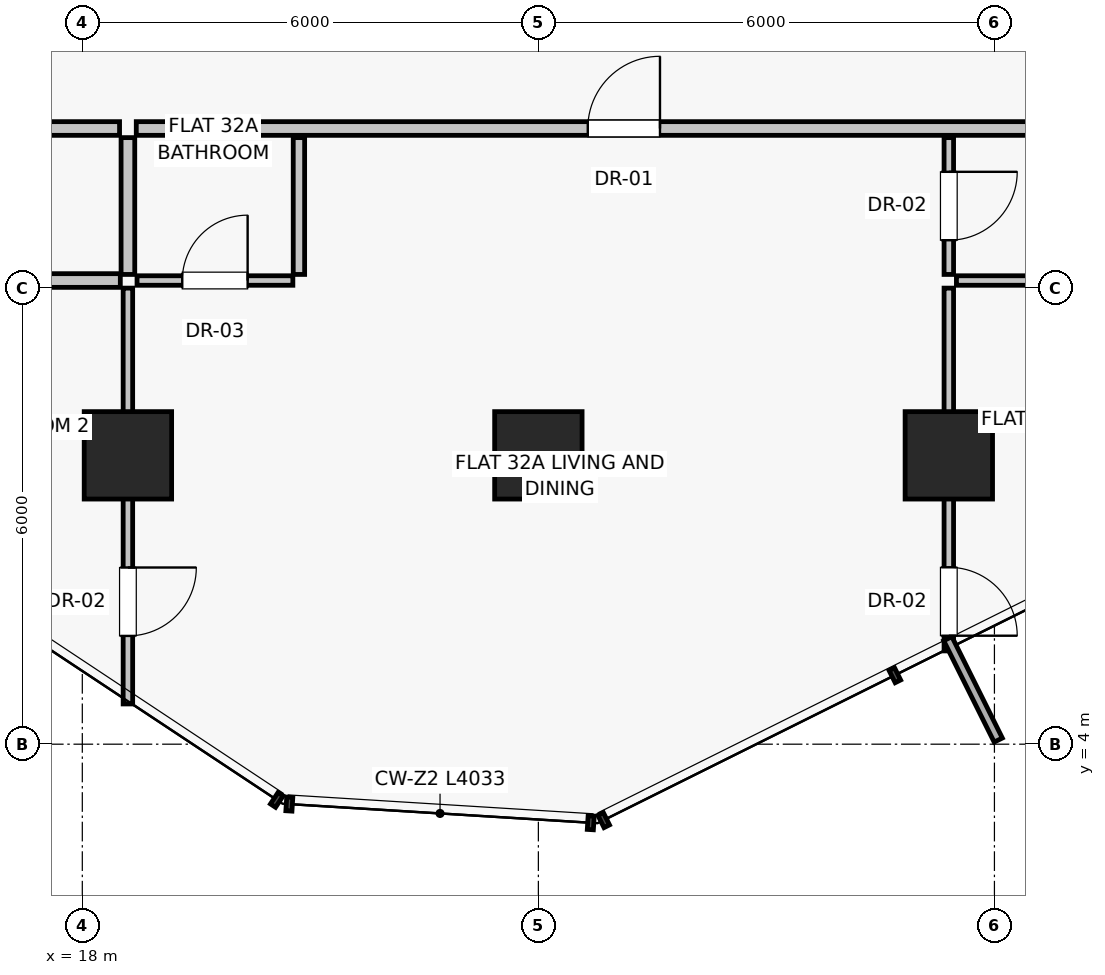
"""IFC4 building model, lengths in metres.
Left out: names, types, materials, properties, quantities, classifications, styles, units other than length and angle.
Written with IfcOpenShell. Run it as: python <this file> out.ifc"""

import sys

from ifc_helpers import new_model, si_unit, direction, frame, frame_2d, origin, origin_2d, place, context, subcontext, project, spatial, rectangle, extrude, source, transform, mapped, element, fill, save


model = new_model("IFC4")
c1 = context("Model", 3, precision=1e-05, world=origin(), true_north=direction((0.0, 1.0)))
c2 = subcontext(c1, "Body", "Model", "MODEL_VIEW")
j1 = project(units=[si_unit("LENGTHUNIT", "METRE"), si_unit("PLANEANGLEUNIT", "RADIAN")], contexts=[c1])
p1 = place(None, origin())
s1 = spatial("IfcSite", under=j1, at=p1, CompositionType="ELEMENT")
p2 = place(p1, origin())
s2 = spatial("IfcBuilding", under=s1, at=p2, CompositionType="ELEMENT")
p3 = place(p2, frame((0.0, 0.0, 116.5)))
s3 = spatial("IfcBuildingStorey", under=s2, at=p3, CompositionType="ELEMENT", Elevation=116.5)
for number, where, z_axis, x_axis in (
    (1, (18.6, 7.8, 0.0), (0.0, 0.0, 1.0), (1.0, 0.0, 0.0)),
    (2, (24.0, 7.8, 0.0), (0.0, 0.0, 1.0), (1.0, 0.0, 0.0)),
    (3, (29.4, 7.8, 0.0), (0.0, 0.0, 1.0), (1.0, 0.0, 0.0)),
):
    element("IfcColumn", number, at=place(p3, frame(where, z_axis=z_axis, x_axis=x_axis)), inside=s3, PredefinedType="COLUMN", context=c2, shape_type="SweptSolid", body=[
        extrude(rectangle(XDim=1.15, YDim=1.15, at=origin_2d()), origin(), (0.0, 0.0, 1.0), 3.25),
    ])
p4 = place(p3, frame((14.51, 12.1, 0.0), z_axis=(0.0, 0.0, 1.0), x_axis=(1.0, 0.0, 0.0)))
e4 = element("IfcWall", 4, at=p4, inside=s3, PredefinedType="PARTITIONING", context=c2, shape_type="SweptSolid", body=[
    extrude(rectangle(XDim=3.98, YDim=0.18, at=frame_2d((1.99, 0.0))), origin(), (0.0, 0.0, 1.0), 2.58),
])
p5 = place(p4, frame((1.49, 0.0, 0.0)))
e5 = element("IfcOpeningElement", 5, at=p5, cuts=e4, PredefinedType="OPENING", context=c2, shape_type="SweptSolid", body=[
    extrude(rectangle(XDim=1.0, YDim=2.01, at=frame_2d((0.5, 1.005))), frame((0.0, 0.1, 0.0), z_axis=(0.0, -1.0, 0.0), x_axis=(1.0, 0.0, 0.0)), (0.0, 0.0, 1.0), 0.2),
])
p6 = place(p3, frame((18.71, 12.1, 0.0), z_axis=(0.0, 0.0, 1.0), x_axis=(1.0, 0.0, 0.0)))
e6 = element("IfcWall", 6, at=p6, inside=s3, PredefinedType="PARTITIONING", context=c2, shape_type="SweptSolid", body=[
    extrude(rectangle(XDim=14.78, YDim=0.18, at=frame_2d((7.39, 0.0))), origin(), (0.0, 0.0, 1.0), 2.58),
])
p7 = place(p6, frame((5.94, 0.0, 0.0)))
e7 = element("IfcOpeningElement", 7, at=p7, cuts=e6, PredefinedType="OPENING", context=c2, shape_type="SweptSolid", body=[
    extrude(rectangle(XDim=0.95, YDim=2.02, at=frame_2d((0.475, 1.01))), frame((0.0, 0.1, 0.0), z_axis=(0.0, -1.0, 0.0), x_axis=(1.0, 0.0, 0.0)), (0.0, 0.0, 1.0), 0.2),
])
p8 = place(p3, frame((14.52, 10.1, 0.0), z_axis=(0.0, 0.0, 1.0), x_axis=(1.0, 0.0, 0.0)))
e8 = element("IfcWall", 8, at=p8, inside=s3, PredefinedType="PARTITIONING", context=c2, shape_type="SweptSolid", body=[
    extrude(rectangle(XDim=3.98, YDim=0.18, at=frame_2d((1.99, 0.0))), origin(), (0.0, 0.0, 1.0), 3.0),
])
p9 = place(p3, frame((18.6, 11.98, 0.0), z_axis=(0.0, 0.0, 1.0), x_axis=(0.0, -1.0, 0.0)))
e9 = element("IfcWall", 9, at=p9, inside=s3, PredefinedType="PARTITIONING", context=c2, shape_type="SweptSolid", body=[
    extrude(rectangle(XDim=1.8, YDim=0.18, at=frame_2d((0.9, 0.0))), origin(), (0.0, 0.0, 1.0), 2.378),
])
p10 = place(p3, frame((18.6, 10.0, 0.0), z_axis=(0.0, 0.0, 1.0), x_axis=(0.0, -1.0, 0.0)))
e10 = element("IfcWall", 10, at=p10, inside=s3, PredefinedType="PARTITIONING", context=c2, shape_type="SweptSolid", body=[
    extrude(rectangle(XDim=5.471, YDim=0.125, at=frame_2d((2.735, 0.0))), origin(), (0.0, 0.0, 1.0), 2.378),
])
p11 = place(p10, frame((3.676, 0.0, 0.0)))
e11 = element("IfcOpeningElement", 11, at=p11, cuts=e10, PredefinedType="OPENING", context=c2, shape_type="SweptSolid", body=[
    extrude(rectangle(XDim=0.9, YDim=2.01, at=frame_2d((0.45, 1.005))), frame((0.0, 0.073, 0.0), z_axis=(0.0, -1.0, 0.0), x_axis=(1.0, 0.0, 0.0)), (0.0, 0.0, 1.0), 0.145),
])
p12 = place(p3, frame((20.85, 11.98, 0.0), z_axis=(0.0, 0.0, 1.0), x_axis=(0.0, -1.0, 0.0)))
e12 = element("IfcWall", 12, at=p12, inside=s3, PredefinedType="PARTITIONING", context=c2, shape_type="SweptSolid", body=[
    extrude(rectangle(XDim=1.8, YDim=0.15, at=frame_2d((0.9, 0.0))), origin(), (0.0, 0.0, 1.0), 3.0),
])
p13 = place(p3, frame((18.72, 10.1, 0.0), z_axis=(0.0, 0.0, 1.0), x_axis=(1.0, 0.0, 0.0)))
e13 = element("IfcWall", 13, at=p13, inside=s3, PredefinedType="PARTITIONING", context=c2, shape_type="SweptSolid", body=[
    extrude(rectangle(XDim=2.05, YDim=0.125, at=frame_2d((1.025, 0.0))), origin(), (0.0, 0.0, 1.0), 3.0),
])
p14 = place(p13, frame((0.595, 0.0, 0.0)))
e14 = element("IfcOpeningElement", 14, at=p14, cuts=e13, PredefinedType="OPENING", context=c2, shape_type="SweptSolid", body=[
    extrude(rectangle(XDim=0.86, YDim=2.01, at=frame_2d((0.43, 1.005))), frame((0.0, 0.073, 0.0), z_axis=(0.0, -1.0, 0.0), x_axis=(1.0, 0.0, 0.0)), (0.0, 0.0, 1.0), 0.145),
])
p15 = place(p3, frame((29.4, 11.98, 0.0), z_axis=(0.0, 0.0, 1.0), x_axis=(0.0, -1.0, 0.0)))
e15 = element("IfcWall", 15, at=p15, inside=s3, PredefinedType="PARTITIONING", context=c2, shape_type="SweptSolid", body=[
    extrude(rectangle(XDim=1.8, YDim=0.125, at=frame_2d((0.9, 0.0))), origin(), (0.0, 0.0, 1.0), 2.378),
])
p16 = place(p15, frame((0.45, 0.0, 0.0)))
e16 = element("IfcOpeningElement", 16, at=p16, cuts=e15, PredefinedType="OPENING", context=c2, shape_type="SweptSolid", body=[
    extrude(rectangle(XDim=0.9, YDim=2.01, at=frame_2d((0.45, 1.005))), frame((0.0, 0.073, 0.0), z_axis=(0.0, -1.0, 0.0), x_axis=(1.0, 0.0, 0.0)), (0.0, 0.0, 1.0), 0.145),
])
p17 = place(p3, frame((29.5, 10.1, 0.0), z_axis=(0.0, 0.0, 1.0), x_axis=(1.0, 0.0, 0.0)))
e17 = element("IfcWall", 17, at=p17, inside=s3, PredefinedType="PARTITIONING", context=c2, shape_type="SweptSolid", body=[
    extrude(rectangle(XDim=3.98, YDim=0.125, at=frame_2d((1.99, 0.0))), origin(), (0.0, 0.0, 1.0), 3.0),
])
p18 = place(p3, frame((29.4, 10.0, 0.0), z_axis=(0.0, 0.0, 1.0), x_axis=(0.0, -1.0, 0.0)))
e18 = element("IfcWall", 18, at=p18, inside=s3, PredefinedType="PARTITIONING", context=c2, shape_type="SweptSolid", body=[
    extrude(rectangle(XDim=4.773, YDim=0.125, at=frame_2d((2.386, 0.0))), origin(), (0.0, 0.0, 1.0), 2.378),
])
p19 = place(p18, frame((3.673, 0.0, 0.0)))
e19 = element("IfcOpeningElement", 19, at=p19, cuts=e18, PredefinedType="OPENING", context=c2, shape_type="SweptSolid", body=[
    extrude(rectangle(XDim=0.9, YDim=2.01, at=frame_2d((0.45, 1.005))), frame((0.0, 0.073, 0.0), z_axis=(0.0, -1.0, 0.0), x_axis=(1.0, 0.0, 0.0)), (0.0, 0.0, 1.0), 0.145),
])
m1 = source(origin(), c2, "Body", "SweptSolid", [
    extrude(rectangle(XDim=0.95, YDim=2.02, at=frame_2d((0.475, 1.01))), frame((0.0, 0.025, 0.0), z_axis=(0.0, -1.0, 0.0), x_axis=(1.0, 0.0, 0.0)), (0.0, 0.0, 1.0), 0.05),
])
p20 = place(p7, origin())
e20 = element("IfcDoor", 20, at=p20, inside=s3, OperationType="SINGLE_SWING_RIGHT", PredefinedType="DOOR", context=c2, shape_type="MappedRepresentation", body=[
    mapped(m1, transform((0.0, 0.0, 0.0), scale=1.0)),
])
fill(e7, e20)
m2 = source(origin(), c2, "Body", "SweptSolid", [
    extrude(rectangle(XDim=0.9, YDim=2.01, at=frame_2d((0.45, 1.005))), frame((0.0, 0.025, 0.0), z_axis=(0.0, -1.0, 0.0), x_axis=(1.0, 0.0, 0.0)), (0.0, 0.0, 1.0), 0.05),
])
p21 = place(p11, origin())
e21 = element("IfcDoor", 21, at=p21, inside=s3, OperationType="SINGLE_SWING_LEFT", PredefinedType="DOOR", context=c2, shape_type="MappedRepresentation", body=[
    mapped(m2, transform((0.0, 0.0, 0.0), scale=1.0)),
])
fill(e11, e21)
m3 = source(origin(), c2, "Body", "SweptSolid", [
    extrude(rectangle(XDim=0.86, YDim=2.01, at=frame_2d((0.43, 1.005))), frame((0.0, 0.025, 0.0), z_axis=(0.0, -1.0, 0.0), x_axis=(1.0, 0.0, 0.0)), (0.0, 0.0, 1.0), 0.05),
])
p22 = place(p14, origin())
e22 = element("IfcDoor", 22, at=p22, inside=s3, OperationType="SINGLE_SWING_RIGHT", PredefinedType="DOOR", context=c2, shape_type="MappedRepresentation", body=[
    mapped(m3, transform((0.0, 0.0, 0.0), scale=1.0)),
])
fill(e14, e22)
p23 = place(p16, origin())
e23 = element("IfcDoor", 23, at=p23, inside=s3, OperationType="SINGLE_SWING_LEFT", PredefinedType="DOOR", context=c2, shape_type="MappedRepresentation", body=[
    mapped(m2, transform((0.0, 0.0, 0.0), scale=1.0)),
])
fill(e16, e23)
p24 = place(p19, origin())
e24 = element("IfcDoor", 24, at=p24, inside=s3, OperationType="SINGLE_SWING_RIGHT", PredefinedType="DOOR", context=c2, shape_type="MappedRepresentation", body=[
    mapped(m2, transform((0.0, 0.0, 0.0), scale=1.0)),
])
fill(e19, e24)
save(model, sys.argv[1])
